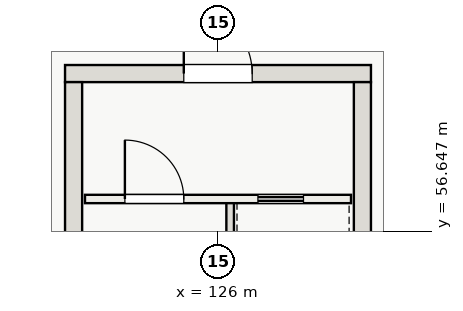
"""IFC4 building model, lengths in metres.
Left out: names, types, materials, properties, quantities, classifications, styles, units other than length and angle.
Written with IfcOpenShell. Run it as: python <this file> out.ifc"""

import sys

from ifc_helpers import new_model, si_unit, direction, frame, frame_2d, origin, place, context, subcontext, project, spatial, rectangle, extrude, element, fill, save


model = new_model("IFC4")
c1 = context("Model", 3, precision=1e-05, world=origin(), true_north=direction((0.0, 1.0)))
c2 = subcontext(c1, "Body", "Model", "MODEL_VIEW")
j1 = project(units=[si_unit("LENGTHUNIT", "METRE"), si_unit("PLANEANGLEUNIT", "RADIAN")], contexts=[c1])
p1 = place(None, origin())
s1 = spatial("IfcSite", under=j1, at=p1, CompositionType="ELEMENT")
p2 = place(p1, origin())
s2 = spatial("IfcBuilding", under=s1, at=p2, CompositionType="ELEMENT")
p3 = place(p2, origin())
s3 = spatial("IfcBuildingStorey", under=s2, at=p3, CompositionType="ELEMENT", Elevation=0.0)
p4 = place(p3, frame((121.975, 60.8, 0.0), z_axis=(0.0, 0.0, 1.0), x_axis=(1.0, 0.0, 0.0)))
e1 = element("IfcWall", 1, at=p4, inside=s3, PredefinedType="SHEAR", context=c2, shape_type="SweptSolid", body=[
    extrude(rectangle(XDim=8.05, YDim=0.45, at=frame_2d((4.025, 0.0))), origin(), (0.0, 0.0, 1.0), 6.0),
])
p5 = place(p4, frame((3.125, 0.0, 0.0)))
e2 = element("IfcOpeningElement", 2, at=p5, cuts=e1, PredefinedType="OPENING", context=c2, shape_type="SweptSolid", body=[
    extrude(rectangle(XDim=1.8, YDim=2.3, at=frame_2d((0.9, 1.15))), frame((0.0, 0.235, 0.0), z_axis=(0.0, -1.0, 0.0), x_axis=(1.0, 0.0, 0.0)), (0.0, 0.0, 1.0), 0.47),
])
for number, where, z_axis, x_axis in (
    (3, (122.2, 49.425, 0.0), (0.0, 0.0, 1.0), (0.0, 1.0, 0.0)),
    (4, (129.8, 49.425, 0.0), (0.0, 0.0, 1.0), (0.0, 1.0, 0.0)),
):
    element("IfcWall", number, at=place(p3, frame(where, z_axis=z_axis, x_axis=x_axis)), inside=s3, PredefinedType="SHEAR", context=c2, shape_type="SweptSolid", body=[
        extrude(rectangle(XDim=11.15, YDim=0.45, at=frame_2d((5.575, 0.0))), origin(), (0.0, 0.0, 1.0), 6.0),
    ])
p6 = place(p3, frame((126.32, 49.45, 0.0), z_axis=(0.0, 0.0, 1.0), x_axis=(0.0, 1.0, 0.0)))
e5 = element("IfcWall", 5, at=p6, inside=s3, PredefinedType="SOLIDWALL", context=c2, shape_type="SweptSolid", body=[
    extrude(rectangle(XDim=8.0, YDim=0.2, at=frame_2d((4.0, 0.0))), origin(), (0.0, 0.0, 1.0), 6.0),
])
p7 = place(p3, frame((122.5, 57.5, 0.0), z_axis=(0.0, 0.0, 1.0), x_axis=(1.0, 0.0, 0.0)))
e6 = element("IfcWall", 6, at=p7, inside=s3, PredefinedType="SOLIDWALL", context=c2, shape_type="SweptSolid", body=[
    extrude(rectangle(XDim=7.0, YDim=0.22, at=frame_2d((3.5, 0.0))), origin(), (0.0, 0.0, 1.0), 5.68),
])
p8 = place(p7, frame((1.05, 0.0, 0.0)))
e7 = element("IfcOpeningElement", 7, at=p8, cuts=e6, PredefinedType="OPENING", context=c2, shape_type="SweptSolid", body=[
    extrude(rectangle(XDim=1.55, YDim=2.2, at=frame_2d((0.775, 1.1))), frame((0.0, 0.12, 0.0), z_axis=(0.0, -1.0, 0.0), x_axis=(1.0, 0.0, 0.0)), (0.0, 0.0, 1.0), 0.24),
])
p9 = place(p7, frame((4.55, 0.0, 0.0)))
e8 = element("IfcOpeningElement", 8, at=p9, cuts=e6, PredefinedType="OPENING", context=c2, shape_type="SweptSolid", body=[
    extrude(rectangle(XDim=1.2, YDim=2.2, at=frame_2d((0.6, 1.1))), frame((0.0, 0.12, 0.0), z_axis=(0.0, -1.0, 0.0), x_axis=(1.0, 0.0, 0.0)), (0.0, 0.0, 1.0), 0.24),
])
p10 = place(p8, origin())
e9 = element("IfcDoor", 9, at=p10, inside=s3, OperationType="SINGLE_SWING_LEFT", PredefinedType="DOOR", context=c2, shape_type="SweptSolid", body=[
    extrude(rectangle(XDim=1.55, YDim=2.2, at=frame_2d((0.775, 1.1))), frame((0.0, 0.025, 0.0), z_axis=(0.0, -1.0, 0.0), x_axis=(1.0, 0.0, 0.0)), (0.0, 0.0, 1.0), 0.05),
])
fill(e7, e9)
p11 = place(p9, origin())
e10 = element("IfcDoor", 10, at=p11, inside=s3, OperationType="SLIDING_TO_LEFT", PredefinedType="DOOR", context=c2, shape_type="SweptSolid", body=[
    extrude(rectangle(XDim=1.2, YDim=2.2, at=frame_2d((0.6, 1.1))), frame((0.0, 0.025, 0.0), z_axis=(0.0, -1.0, 0.0), x_axis=(1.0, 0.0, 0.0)), (0.0, 0.0, 1.0), 0.05),
])
fill(e8, e10)
p12 = place(p5, origin())
e11 = element("IfcDoor", 11, at=p12, inside=s3, OperationType="DOUBLE_DOOR_SINGLE_SWING", PredefinedType="DOOR", context=c2, shape_type="SweptSolid", body=[
    extrude(rectangle(XDim=1.8, YDim=2.3, at=frame_2d((0.9, 1.15))), frame((0.0, 0.025, 0.0), z_axis=(0.0, -1.0, 0.0), x_axis=(1.0, 0.0, 0.0)), (0.0, 0.0, 1.0), 0.05),
])
fill(e2, e11)
save(model, sys.argv[1])
